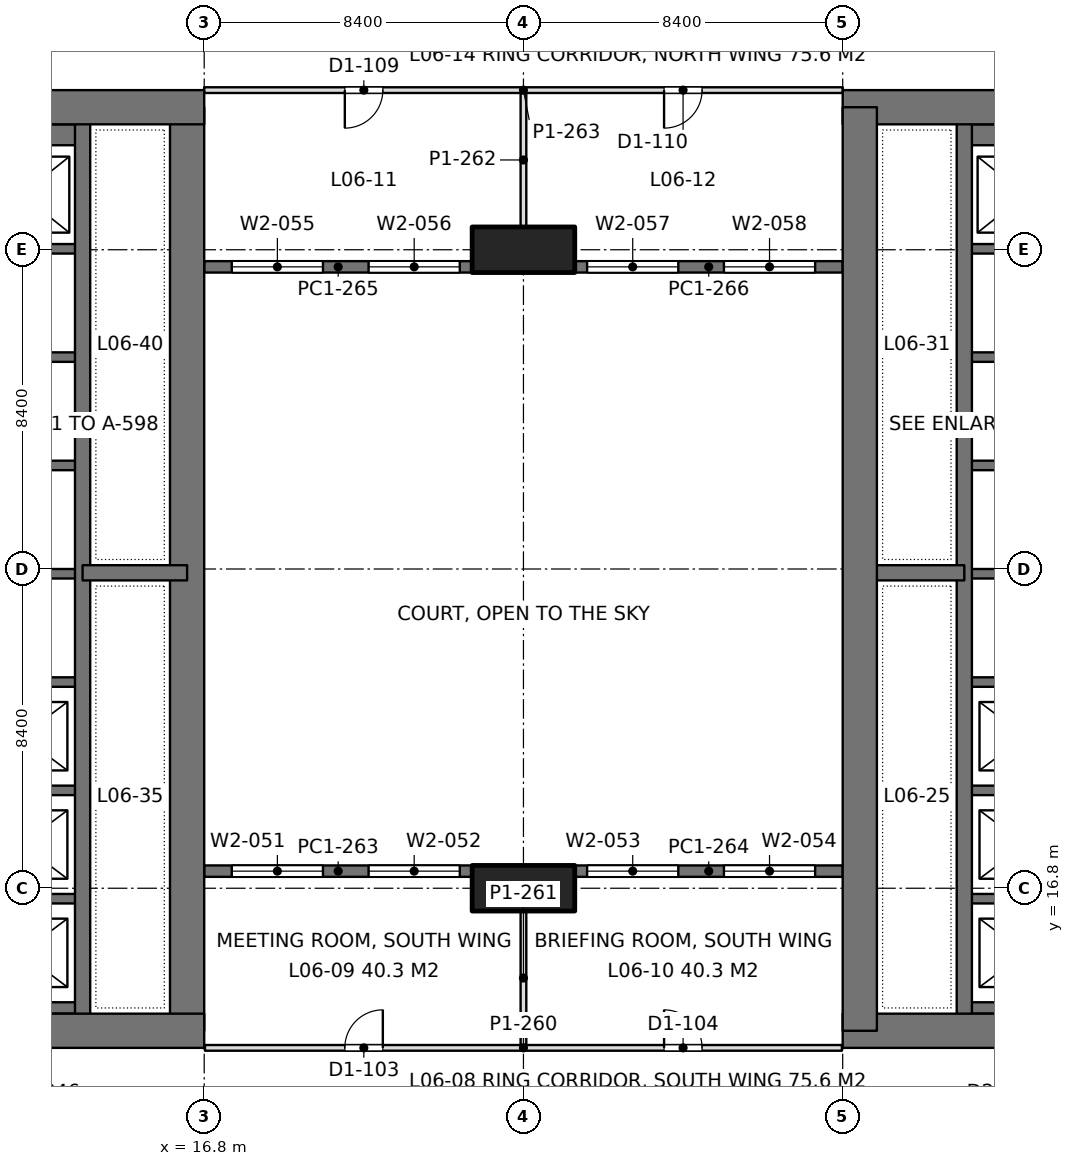
"""IFC4 building model, lengths in metres.
Left out: names, types, materials, properties, quantities, classifications, styles, units other than length and angle.
Written with IfcOpenShell. Run it as: python <this file> out.ifc"""

import sys

from ifc_helpers import new_model, si_unit, direction, frame, frame_2d, origin, origin_2d, place, context, subcontext, project, spatial, rectangle, extrude, element, fill, save


model = new_model("IFC4")
c1 = context("Model", 3, precision=1e-05, world=origin(), true_north=direction((0.0, 1.0)))
c2 = subcontext(c1, "Body", "Model", "MODEL_VIEW")
j1 = project(units=[si_unit("LENGTHUNIT", "METRE"), si_unit("PLANEANGLEUNIT", "RADIAN")], contexts=[c1])
p1 = place(None, origin())
s1 = spatial("IfcSite", under=j1, at=p1, CompositionType="ELEMENT")
p2 = place(p1, origin())
s2 = spatial("IfcBuilding", under=s1, at=p2, CompositionType="ELEMENT")
p3 = place(p2, frame((0.0, 0.0, 27.9)))
s3 = spatial("IfcBuildingStorey", under=s2, at=p3, CompositionType="ELEMENT", Elevation=27.9)
for number, where, z_axis, x_axis in (
    (1, (25.2, 16.8, 0.0), (0.0, 0.0, 1.0), (1.0, 0.0, 0.0)),
    (2, (25.2, 33.6, 0.0), (0.0, 0.0, 1.0), (1.0, 0.0, 0.0)),
):
    element("IfcColumn", number, at=place(p3, frame(where, z_axis=z_axis, x_axis=x_axis)), inside=s3, PredefinedType="COLUMN", context=c2, shape_type="SweptSolid", body=[
        extrude(rectangle(XDim=2.7, YDim=1.2, at=origin_2d()), origin(), (0.0, 0.0, 1.0), 4.5),
    ])
p4 = place(p3, frame((-1.2, 13.05, 0.0), z_axis=(0.0, 0.0, 1.0), x_axis=(1.0, 0.0, 0.0)))
e3 = element("IfcWall", 3, at=p4, inside=s3, PredefinedType="SHEAR", context=c2, shape_type="SweptSolid", body=[
    extrude(rectangle(XDim=18.0, YDim=0.9, at=frame_2d((9.0, 0.0))), origin(), (0.0, 0.0, 1.0), 4.5),
])
p5 = place(p4, frame((8.95, 0.0, 0.0)))
e4 = element("IfcOpeningElement", 4, at=p5, cuts=e3, PredefinedType="OPENING", context=c2, shape_type="SweptSolid", body=[
    extrude(rectangle(XDim=1.8, YDim=2.4, at=frame_2d((0.9, 1.2))), frame((0.0, 0.46, 0.0), z_axis=(0.0, -1.0, 0.0), x_axis=(1.0, 0.0, 0.0)), (0.0, 0.0, 1.0), 0.92),
])
p6 = place(p3, frame((-1.2, 37.35, 0.0), z_axis=(0.0, 0.0, 1.0), x_axis=(1.0, 0.0, 0.0)))
e5 = element("IfcWall", 5, at=p6, inside=s3, PredefinedType="SHEAR", context=c2, shape_type="SweptSolid", body=[
    extrude(rectangle(XDim=18.0, YDim=0.9, at=frame_2d((9.0, 0.0))), origin(), (0.0, 0.0, 1.0), 4.5),
])
p7 = place(p6, frame((8.95, 0.0, 0.0)))
e6 = element("IfcOpeningElement", 6, at=p7, cuts=e5, PredefinedType="OPENING", context=c2, shape_type="SweptSolid", body=[
    extrude(rectangle(XDim=1.8, YDim=2.4, at=frame_2d((0.9, 1.2))), frame((0.0, 0.46, 0.0), z_axis=(0.0, -1.0, 0.0), x_axis=(1.0, 0.0, 0.0)), (0.0, 0.0, 1.0), 0.92),
])
p8 = place(p3, frame((16.35, 13.05, 0.0), z_axis=(0.0, 0.0, 1.0), x_axis=(0.0, 1.0, 0.0)))
e7 = element("IfcWall", 7, at=p8, inside=s3, PredefinedType="SHEAR", context=c2, shape_type="SweptSolid", body=[
    extrude(rectangle(XDim=24.3, YDim=0.9, at=frame_2d((12.15, 0.0))), origin(), (0.0, 0.0, 1.0), 4.5),
])
p9 = place(p3, frame((13.6, 13.05, 0.0), z_axis=(0.0, 0.0, 1.0), x_axis=(0.0, 1.0, 0.0)))
e8 = element("IfcWall", 8, at=p9, inside=s3, PredefinedType="SHEAR", context=c2, shape_type="SweptSolid", body=[
    extrude(rectangle(XDim=24.3, YDim=0.4, at=frame_2d((12.15, 0.0))), origin(), (0.0, 0.0, 1.0), 4.5),
])
p10 = place(p3, frame((13.6, 25.1, 0.0), z_axis=(0.0, 0.0, 1.0), x_axis=(1.0, 0.0, 0.0)))
e9 = element("IfcWall", 9, at=p10, inside=s3, PredefinedType="SHEAR", context=c2, shape_type="SweptSolid", body=[
    extrude(rectangle(XDim=2.75, YDim=0.4, at=frame_2d((1.375, 0.0))), origin(), (0.0, 0.0, 1.0), 4.5),
])
p11 = place(p3, frame((10.4, 13.65, 0.0), z_axis=(0.0, 0.0, 1.0), x_axis=(1.0, 0.0, 0.0)))
e10 = element("IfcWall", 10, at=p11, inside=s3, PredefinedType="SHEAR", context=c2, shape_type="SweptSolid", body=[
    extrude(rectangle(XDim=3.2, YDim=0.3, at=frame_2d((1.6, 0.0))), origin(), (0.0, 0.0, 1.0), 4.5),
])
for number, where, z_axis, x_axis in (
    (11, (10.4, 16.525, 0.0), (0.0, 0.0, 1.0), (1.0, 0.0, 0.0)),
    (12, (10.4, 19.375, 0.0), (0.0, 0.0, 1.0), (1.0, 0.0, 0.0)),
    (13, (10.4, 22.225, 0.0), (0.0, 0.0, 1.0), (1.0, 0.0, 0.0)),
    (14, (10.4, 25.075, 0.0), (0.0, 0.0, 1.0), (1.0, 0.0, 0.0)),
    (15, (10.4, 27.925, 0.0), (0.0, 0.0, 1.0), (1.0, 0.0, 0.0)),
    (16, (10.4, 30.775, 0.0), (0.0, 0.0, 1.0), (1.0, 0.0, 0.0)),
    (17, (10.4, 33.625, 0.0), (0.0, 0.0, 1.0), (1.0, 0.0, 0.0)),
):
    element("IfcWall", number, at=place(p3, frame(where, z_axis=z_axis, x_axis=x_axis)), inside=s3, PredefinedType="SHEAR", context=c2, shape_type="SweptSolid", body=[
        extrude(rectangle(XDim=3.2, YDim=0.25, at=frame_2d((1.6, 0.0))), origin(), (0.0, 0.0, 1.0), 4.5),
    ])
p12 = place(p3, frame((10.4, 36.625, 0.0), z_axis=(0.0, 0.0, 1.0), x_axis=(1.0, 0.0, 0.0)))
e18 = element("IfcWall", 18, at=p12, inside=s3, PredefinedType="SHEAR", context=c2, shape_type="SweptSolid", body=[
    extrude(rectangle(XDim=3.2, YDim=0.55, at=frame_2d((1.6, 0.0))), origin(), (0.0, 0.0, 1.0), 4.5),
])
p13 = place(p3, frame((33.6, 13.05, 0.0), z_axis=(0.0, 0.0, 1.0), x_axis=(1.0, 0.0, 0.0)))
e19 = element("IfcWall", 19, at=p13, inside=s3, PredefinedType="SHEAR", context=c2, shape_type="SweptSolid", body=[
    extrude(rectangle(XDim=18.0, YDim=0.9, at=frame_2d((9.0, 0.0))), origin(), (0.0, 0.0, 1.0), 4.5),
])
p14 = place(p13, frame((7.25, 0.0, 0.0)))
e20 = element("IfcOpeningElement", 20, at=p14, cuts=e19, PredefinedType="OPENING", context=c2, shape_type="SweptSolid", body=[
    extrude(rectangle(XDim=1.8, YDim=2.4, at=frame_2d((0.9, 1.2))), frame((0.0, 0.46, 0.0), z_axis=(0.0, -1.0, 0.0), x_axis=(1.0, 0.0, 0.0)), (0.0, 0.0, 1.0), 0.92),
])
p15 = place(p3, frame((33.6, 37.35, 0.0), z_axis=(0.0, 0.0, 1.0), x_axis=(1.0, 0.0, 0.0)))
e21 = element("IfcWall", 21, at=p15, inside=s3, PredefinedType="SHEAR", context=c2, shape_type="SweptSolid", body=[
    extrude(rectangle(XDim=18.0, YDim=0.9, at=frame_2d((9.0, 0.0))), origin(), (0.0, 0.0, 1.0), 4.5),
])
p16 = place(p15, frame((7.25, 0.0, 0.0)))
e22 = element("IfcOpeningElement", 22, at=p16, cuts=e21, PredefinedType="OPENING", context=c2, shape_type="SweptSolid", body=[
    extrude(rectangle(XDim=1.8, YDim=2.4, at=frame_2d((0.9, 1.2))), frame((0.0, 0.46, 0.0), z_axis=(0.0, -1.0, 0.0), x_axis=(1.0, 0.0, 0.0)), (0.0, 0.0, 1.0), 0.92),
])
p17 = place(p3, frame((34.05, 13.05, 0.0), z_axis=(0.0, 0.0, 1.0), x_axis=(0.0, 1.0, 0.0)))
e23 = element("IfcWall", 23, at=p17, inside=s3, PredefinedType="SHEAR", context=c2, shape_type="SweptSolid", body=[
    extrude(rectangle(XDim=24.3, YDim=0.9, at=frame_2d((12.15, 0.0))), origin(), (0.0, 0.0, 1.0), 4.5),
])
p18 = place(p3, frame((36.8, 13.05, 0.0), z_axis=(0.0, 0.0, 1.0), x_axis=(0.0, 1.0, 0.0)))
e24 = element("IfcWall", 24, at=p18, inside=s3, PredefinedType="SHEAR", context=c2, shape_type="SweptSolid", body=[
    extrude(rectangle(XDim=24.3, YDim=0.4, at=frame_2d((12.15, 0.0))), origin(), (0.0, 0.0, 1.0), 4.5),
])
p19 = place(p3, frame((36.8, 25.1, 0.0), z_axis=(0.0, 0.0, 1.0), x_axis=(-1.0, 0.0, 0.0)))
e25 = element("IfcWall", 25, at=p19, inside=s3, PredefinedType="SHEAR", context=c2, shape_type="SweptSolid", body=[
    extrude(rectangle(XDim=2.75, YDim=0.4, at=frame_2d((1.375, 0.0))), origin(), (0.0, 0.0, 1.0), 4.5),
])
p20 = place(p3, frame((40.0, 13.65, 0.0), z_axis=(0.0, 0.0, 1.0), x_axis=(-1.0, 0.0, 0.0)))
e26 = element("IfcWall", 26, at=p20, inside=s3, PredefinedType="SHEAR", context=c2, shape_type="SweptSolid", body=[
    extrude(rectangle(XDim=3.2, YDim=0.3, at=frame_2d((1.6, 0.0))), origin(), (0.0, 0.0, 1.0), 4.5),
])
for number, where, z_axis, x_axis in (
    (27, (40.0, 16.525, 0.0), (0.0, 0.0, 1.0), (-1.0, 0.0, 0.0)),
    (28, (40.0, 19.375, 0.0), (0.0, 0.0, 1.0), (-1.0, 0.0, 0.0)),
    (29, (40.0, 22.225, 0.0), (0.0, 0.0, 1.0), (-1.0, 0.0, 0.0)),
    (30, (40.0, 25.075, 0.0), (0.0, 0.0, 1.0), (-1.0, 0.0, 0.0)),
    (31, (40.0, 27.925, 0.0), (0.0, 0.0, 1.0), (-1.0, 0.0, 0.0)),
    (32, (40.0, 30.775, 0.0), (0.0, 0.0, 1.0), (-1.0, 0.0, 0.0)),
    (33, (40.0, 33.625, 0.0), (0.0, 0.0, 1.0), (-1.0, 0.0, 0.0)),
):
    element("IfcWall", number, at=place(p3, frame(where, z_axis=z_axis, x_axis=x_axis)), inside=s3, PredefinedType="SHEAR", context=c2, shape_type="SweptSolid", body=[
        extrude(rectangle(XDim=3.2, YDim=0.25, at=frame_2d((1.6, 0.0))), origin(), (0.0, 0.0, 1.0), 4.5),
    ])
p21 = place(p3, frame((40.0, 36.625, 0.0), z_axis=(0.0, 0.0, 1.0), x_axis=(-1.0, 0.0, 0.0)))
e34 = element("IfcWall", 34, at=p21, inside=s3, PredefinedType="SHEAR", context=c2, shape_type="SweptSolid", body=[
    extrude(rectangle(XDim=3.2, YDim=0.55, at=frame_2d((1.6, 0.0))), origin(), (0.0, 0.0, 1.0), 4.5),
])
p22 = place(p3, frame((16.8, 17.25, 0.0), z_axis=(0.0, 0.0, 1.0), x_axis=(1.0, 0.0, 0.0)))
e35 = element("IfcWall", 35, at=p22, inside=s3, PredefinedType="SOLIDWALL", context=c2, shape_type="SweptSolid", body=[
    extrude(rectangle(XDim=7.05, YDim=0.3, at=frame_2d((3.525, 0.0))), origin(), (0.0, 0.0, 1.0), 4.34),
])
p23 = place(p22, frame((0.725, 0.0, 0.9)))
e36 = element("IfcOpeningElement", 36, at=p23, cuts=e35, PredefinedType="OPENING", context=c2, shape_type="SweptSolid", body=[
    extrude(rectangle(XDim=2.4, YDim=1.9, at=frame_2d((1.2, 0.95))), frame((0.0, 0.16, 0.0), z_axis=(0.0, -1.0, 0.0), x_axis=(1.0, 0.0, 0.0)), (0.0, 0.0, 1.0), 0.32),
])
p24 = place(p22, frame((4.325, 0.0, 0.9)))
e37 = element("IfcOpeningElement", 37, at=p24, cuts=e35, PredefinedType="OPENING", context=c2, shape_type="SweptSolid", body=[
    extrude(rectangle(XDim=2.4, YDim=1.9, at=frame_2d((1.2, 0.95))), frame((0.0, 0.16, 0.0), z_axis=(0.0, -1.0, 0.0), x_axis=(1.0, 0.0, 0.0)), (0.0, 0.0, 1.0), 0.32),
])
p25 = place(p3, frame((26.55, 17.25, 0.0), z_axis=(0.0, 0.0, 1.0), x_axis=(1.0, 0.0, 0.0)))
e38 = element("IfcWall", 38, at=p25, inside=s3, PredefinedType="SOLIDWALL", context=c2, shape_type="SweptSolid", body=[
    extrude(rectangle(XDim=7.05, YDim=0.3, at=frame_2d((3.525, 0.0))), origin(), (0.0, 0.0, 1.0), 4.34),
])
p26 = place(p25, frame((0.325, 0.0, 0.9)))
e39 = element("IfcOpeningElement", 39, at=p26, cuts=e38, PredefinedType="OPENING", context=c2, shape_type="SweptSolid", body=[
    extrude(rectangle(XDim=2.4, YDim=1.9, at=frame_2d((1.2, 0.95))), frame((0.0, 0.16, 0.0), z_axis=(0.0, -1.0, 0.0), x_axis=(1.0, 0.0, 0.0)), (0.0, 0.0, 1.0), 0.32),
])
p27 = place(p25, frame((3.925, 0.0, 0.9)))
e40 = element("IfcOpeningElement", 40, at=p27, cuts=e38, PredefinedType="OPENING", context=c2, shape_type="SweptSolid", body=[
    extrude(rectangle(XDim=2.4, YDim=1.9, at=frame_2d((1.2, 0.95))), frame((0.0, 0.16, 0.0), z_axis=(0.0, -1.0, 0.0), x_axis=(1.0, 0.0, 0.0)), (0.0, 0.0, 1.0), 0.32),
])
p28 = place(p3, frame((16.8, 33.15, 0.0), z_axis=(0.0, 0.0, 1.0), x_axis=(1.0, 0.0, 0.0)))
e41 = element("IfcWall", 41, at=p28, inside=s3, PredefinedType="SOLIDWALL", context=c2, shape_type="SweptSolid", body=[
    extrude(rectangle(XDim=7.05, YDim=0.3, at=frame_2d((3.525, 0.0))), origin(), (0.0, 0.0, 1.0), 4.34),
])
p29 = place(p28, frame((0.725, 0.0, 0.9)))
e42 = element("IfcOpeningElement", 42, at=p29, cuts=e41, PredefinedType="OPENING", context=c2, shape_type="SweptSolid", body=[
    extrude(rectangle(XDim=2.4, YDim=1.9, at=frame_2d((1.2, 0.95))), frame((0.0, 0.16, 0.0), z_axis=(0.0, -1.0, 0.0), x_axis=(1.0, 0.0, 0.0)), (0.0, 0.0, 1.0), 0.32),
])
p30 = place(p28, frame((4.325, 0.0, 0.9)))
e43 = element("IfcOpeningElement", 43, at=p30, cuts=e41, PredefinedType="OPENING", context=c2, shape_type="SweptSolid", body=[
    extrude(rectangle(XDim=2.4, YDim=1.9, at=frame_2d((1.2, 0.95))), frame((0.0, 0.16, 0.0), z_axis=(0.0, -1.0, 0.0), x_axis=(1.0, 0.0, 0.0)), (0.0, 0.0, 1.0), 0.32),
])
p31 = place(p3, frame((26.55, 33.15, 0.0), z_axis=(0.0, 0.0, 1.0), x_axis=(1.0, 0.0, 0.0)))
e44 = element("IfcWall", 44, at=p31, inside=s3, PredefinedType="SOLIDWALL", context=c2, shape_type="SweptSolid", body=[
    extrude(rectangle(XDim=7.05, YDim=0.3, at=frame_2d((3.525, 0.0))), origin(), (0.0, 0.0, 1.0), 4.34),
])
p32 = place(p31, frame((0.325, 0.0, 0.9)))
e45 = element("IfcOpeningElement", 45, at=p32, cuts=e44, PredefinedType="OPENING", context=c2, shape_type="SweptSolid", body=[
    extrude(rectangle(XDim=2.4, YDim=1.9, at=frame_2d((1.2, 0.95))), frame((0.0, 0.16, 0.0), z_axis=(0.0, -1.0, 0.0), x_axis=(1.0, 0.0, 0.0)), (0.0, 0.0, 1.0), 0.32),
])
p33 = place(p31, frame((3.925, 0.0, 0.9)))
e46 = element("IfcOpeningElement", 46, at=p33, cuts=e44, PredefinedType="OPENING", context=c2, shape_type="SweptSolid", body=[
    extrude(rectangle(XDim=2.4, YDim=1.9, at=frame_2d((1.2, 0.95))), frame((0.0, 0.16, 0.0), z_axis=(0.0, -1.0, 0.0), x_axis=(1.0, 0.0, 0.0)), (0.0, 0.0, 1.0), 0.32),
])
p34 = place(p3, frame((25.2, 12.674, 0.0), z_axis=(0.0, 0.0, 1.0), x_axis=(0.0, 1.0, 0.0)))
e47 = element("IfcWall", 47, at=p34, inside=s3, PredefinedType="PARTITIONING", context=c2, shape_type="SweptSolid", body=[
    extrude(rectangle(XDim=3.527, YDim=0.15, at=frame_2d((1.763, 0.0))), origin(), (0.0, 0.0, 1.0), 3.74),
])
p35 = place(p3, frame((16.82, 12.6, 0.0), z_axis=(0.0, 0.0, 1.0), x_axis=(1.0, 0.0, 0.0)))
e48 = element("IfcWall", 48, at=p35, inside=s3, PredefinedType="PARTITIONING", context=c2, shape_type="SweptSolid", body=[
    extrude(rectangle(XDim=16.76, YDim=0.15, at=frame_2d((8.38, 0.0))), origin(), (0.0, 0.0, 1.0), 3.74),
])
p36 = place(p35, frame((3.68, 0.0, 0.0)))
e49 = element("IfcOpeningElement", 49, at=p36, cuts=e48, PredefinedType="OPENING", context=c2, shape_type="SweptSolid", body=[
    extrude(rectangle(XDim=1.0, YDim=2.2, at=frame_2d((0.5, 1.1))), frame((0.0, 0.085, 0.0), z_axis=(0.0, -1.0, 0.0), x_axis=(1.0, 0.0, 0.0)), (0.0, 0.0, 1.0), 0.17),
])
p37 = place(p35, frame((12.08, 0.0, 0.0)))
e50 = element("IfcOpeningElement", 50, at=p37, cuts=e48, PredefinedType="OPENING", context=c2, shape_type="SweptSolid", body=[
    extrude(rectangle(XDim=1.0, YDim=2.2, at=frame_2d((0.5, 1.1))), frame((0.0, 0.085, 0.0), z_axis=(0.0, -1.0, 0.0), x_axis=(1.0, 0.0, 0.0)), (0.0, 0.0, 1.0), 0.17),
])
p38 = place(p3, frame((25.2, 34.199, 0.0), z_axis=(0.0, 0.0, 1.0), x_axis=(0.0, 1.0, 0.0)))
e51 = element("IfcWall", 51, at=p38, inside=s3, PredefinedType="PARTITIONING", context=c2, shape_type="SweptSolid", body=[
    extrude(rectangle(XDim=3.527, YDim=0.15, at=frame_2d((1.764, 0.0))), origin(), (0.0, 0.0, 1.0), 3.74),
])
p39 = place(p3, frame((16.798, 37.8, 0.0), z_axis=(0.0, 0.0, 1.0), x_axis=(1.0, 0.0, 0.0)))
e52 = element("IfcWall", 52, at=p39, inside=s3, PredefinedType="PARTITIONING", context=c2, shape_type="SweptSolid", body=[
    extrude(rectangle(XDim=16.804, YDim=0.15, at=frame_2d((8.402, 0.0))), origin(), (0.0, 0.0, 1.0), 3.74),
])
p40 = place(p39, frame((3.702, 0.0, 0.0)))
e53 = element("IfcOpeningElement", 53, at=p40, cuts=e52, PredefinedType="OPENING", context=c2, shape_type="SweptSolid", body=[
    extrude(rectangle(XDim=1.0, YDim=2.2, at=frame_2d((0.5, 1.1))), frame((0.0, 0.085, 0.0), z_axis=(0.0, -1.0, 0.0), x_axis=(1.0, 0.0, 0.0)), (0.0, 0.0, 1.0), 0.17),
])
p41 = place(p39, frame((12.102, 0.0, 0.0)))
e54 = element("IfcOpeningElement", 54, at=p41, cuts=e52, PredefinedType="OPENING", context=c2, shape_type="SweptSolid", body=[
    extrude(rectangle(XDim=1.0, YDim=2.2, at=frame_2d((0.5, 1.1))), frame((0.0, 0.085, 0.0), z_axis=(0.0, -1.0, 0.0), x_axis=(1.0, 0.0, 0.0)), (0.0, 0.0, 1.0), 0.17),
])
p42 = place(p23, origin())
e55 = element("IfcWindow", 55, at=p42, inside=s3, PartitioningType="SINGLE_PANEL", PredefinedType="WINDOW", context=c2, shape_type="SweptSolid", body=[
    extrude(rectangle(XDim=2.4, YDim=1.9, at=frame_2d((1.2, 0.95))), frame((0.0, 0.03, 0.0), z_axis=(0.0, -1.0, 0.0), x_axis=(1.0, 0.0, 0.0)), (0.0, 0.0, 1.0), 0.06),
])
fill(e36, e55)
p43 = place(p24, origin())
e56 = element("IfcWindow", 56, at=p43, inside=s3, PartitioningType="SINGLE_PANEL", PredefinedType="WINDOW", context=c2, shape_type="SweptSolid", body=[
    extrude(rectangle(XDim=2.4, YDim=1.9, at=frame_2d((1.2, 0.95))), frame((0.0, 0.03, 0.0), z_axis=(0.0, -1.0, 0.0), x_axis=(1.0, 0.0, 0.0)), (0.0, 0.0, 1.0), 0.06),
])
fill(e37, e56)
p44 = place(p26, origin())
e57 = element("IfcWindow", 57, at=p44, inside=s3, PartitioningType="SINGLE_PANEL", PredefinedType="WINDOW", context=c2, shape_type="SweptSolid", body=[
    extrude(rectangle(XDim=2.4, YDim=1.9, at=frame_2d((1.2, 0.95))), frame((0.0, 0.03, 0.0), z_axis=(0.0, -1.0, 0.0), x_axis=(1.0, 0.0, 0.0)), (0.0, 0.0, 1.0), 0.06),
])
fill(e39, e57)
p45 = place(p27, origin())
e58 = element("IfcWindow", 58, at=p45, inside=s3, PartitioningType="SINGLE_PANEL", PredefinedType="WINDOW", context=c2, shape_type="SweptSolid", body=[
    extrude(rectangle(XDim=2.4, YDim=1.9, at=frame_2d((1.2, 0.95))), frame((0.0, 0.03, 0.0), z_axis=(0.0, -1.0, 0.0), x_axis=(1.0, 0.0, 0.0)), (0.0, 0.0, 1.0), 0.06),
])
fill(e40, e58)
p46 = place(p29, origin())
e59 = element("IfcWindow", 59, at=p46, inside=s3, PartitioningType="SINGLE_PANEL", PredefinedType="WINDOW", context=c2, shape_type="SweptSolid", body=[
    extrude(rectangle(XDim=2.4, YDim=1.9, at=frame_2d((1.2, 0.95))), frame((0.0, 0.03, 0.0), z_axis=(0.0, -1.0, 0.0), x_axis=(1.0, 0.0, 0.0)), (0.0, 0.0, 1.0), 0.06),
])
fill(e42, e59)
p47 = place(p30, origin())
e60 = element("IfcWindow", 60, at=p47, inside=s3, PartitioningType="SINGLE_PANEL", PredefinedType="WINDOW", context=c2, shape_type="SweptSolid", body=[
    extrude(rectangle(XDim=2.4, YDim=1.9, at=frame_2d((1.2, 0.95))), frame((0.0, 0.03, 0.0), z_axis=(0.0, -1.0, 0.0), x_axis=(1.0, 0.0, 0.0)), (0.0, 0.0, 1.0), 0.06),
])
fill(e43, e60)
p48 = place(p32, origin())
e61 = element("IfcWindow", 61, at=p48, inside=s3, PartitioningType="SINGLE_PANEL", PredefinedType="WINDOW", context=c2, shape_type="SweptSolid", body=[
    extrude(rectangle(XDim=2.4, YDim=1.9, at=frame_2d((1.2, 0.95))), frame((0.0, 0.03, 0.0), z_axis=(0.0, -1.0, 0.0), x_axis=(1.0, 0.0, 0.0)), (0.0, 0.0, 1.0), 0.06),
])
fill(e45, e61)
p49 = place(p33, origin())
e62 = element("IfcWindow", 62, at=p49, inside=s3, PartitioningType="SINGLE_PANEL", PredefinedType="WINDOW", context=c2, shape_type="SweptSolid", body=[
    extrude(rectangle(XDim=2.4, YDim=1.9, at=frame_2d((1.2, 0.95))), frame((0.0, 0.03, 0.0), z_axis=(0.0, -1.0, 0.0), x_axis=(1.0, 0.0, 0.0)), (0.0, 0.0, 1.0), 0.06),
])
fill(e46, e62)
p50 = place(p36, origin())
e63 = element("IfcDoor", 63, at=p50, inside=s3, OperationType="SINGLE_SWING_RIGHT", PredefinedType="DOOR", context=c2, shape_type="SweptSolid", body=[
    extrude(rectangle(XDim=1.0, YDim=2.2, at=frame_2d((0.5, 1.1))), frame((0.0, 0.025, 0.0), z_axis=(0.0, -1.0, 0.0), x_axis=(1.0, 0.0, 0.0)), (0.0, 0.0, 1.0), 0.05),
])
fill(e49, e63)
p51 = place(p37, origin())
e64 = element("IfcDoor", 64, at=p51, inside=s3, OperationType="SINGLE_SWING_LEFT", PredefinedType="DOOR", context=c2, shape_type="SweptSolid", body=[
    extrude(rectangle(XDim=1.0, YDim=2.2, at=frame_2d((0.5, 1.1))), frame((0.0, 0.025, 0.0), z_axis=(0.0, -1.0, 0.0), x_axis=(1.0, 0.0, 0.0)), (0.0, 0.0, 1.0), 0.05),
])
fill(e50, e64)
p52 = place(p40, frame((1.0, 0.0, 0.0), z_axis=(0.0, 0.0, 1.0), x_axis=(-1.0, 0.0, 0.0)))
e65 = element("IfcDoor", 65, at=p52, inside=s3, OperationType="SINGLE_SWING_RIGHT", PredefinedType="DOOR", context=c2, shape_type="SweptSolid", body=[
    extrude(rectangle(XDim=1.0, YDim=2.2, at=frame_2d((0.5, 1.1))), frame((0.0, 0.025, 0.0), z_axis=(0.0, -1.0, 0.0), x_axis=(1.0, 0.0, 0.0)), (0.0, 0.0, 1.0), 0.05),
])
fill(e53, e65)
p53 = place(p41, frame((1.0, 0.0, 0.0), z_axis=(0.0, 0.0, 1.0), x_axis=(-1.0, 0.0, 0.0)))
e66 = element("IfcDoor", 66, at=p53, inside=s3, OperationType="SINGLE_SWING_RIGHT", PredefinedType="DOOR", context=c2, shape_type="SweptSolid", body=[
    extrude(rectangle(XDim=1.0, YDim=2.2, at=frame_2d((0.5, 1.1))), frame((0.0, 0.025, 0.0), z_axis=(0.0, -1.0, 0.0), x_axis=(1.0, 0.0, 0.0)), (0.0, 0.0, 1.0), 0.05),
])
fill(e54, e66)
save(model, sys.argv[1])
